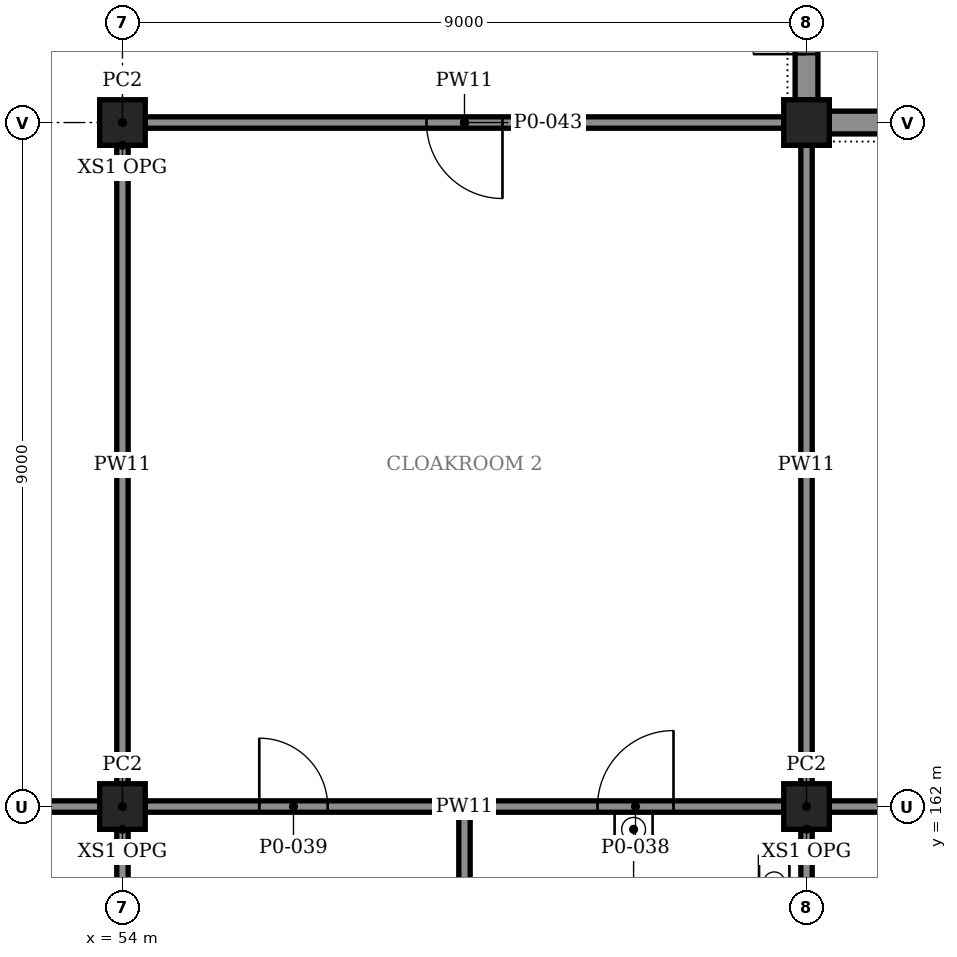
"""IFC4 building model, lengths in metres.
Left out: names, types, materials, properties, quantities, classifications, styles, units other than length and angle.
Written with IfcOpenShell. Run it as: python <this file> out.ifc"""

import sys

from ifc_helpers import new_model, si_unit, direction, frame, frame_2d, origin, origin_2d, place, context, subcontext, project, spatial, rectangle, extrude, element, fill, save


model = new_model("IFC4")
c1 = context("Model", 3, precision=1e-05, world=origin(), true_north=direction((0.0, 1.0)))
c2 = subcontext(c1, "Body", "Model", "MODEL_VIEW")
j1 = project(units=[si_unit("LENGTHUNIT", "METRE"), si_unit("PLANEANGLEUNIT", "RADIAN")], contexts=[c1])
p1 = place(None, origin())
s1 = spatial("IfcSite", under=j1, at=p1, CompositionType="ELEMENT")
p2 = place(p1, origin())
s2 = spatial("IfcBuilding", under=s1, at=p2, CompositionType="ELEMENT")
p3 = place(p2, origin())
s3 = spatial("IfcBuildingStorey", under=s2, at=p3, CompositionType="ELEMENT", Elevation=0.0)
for number, where, z_axis, x_axis in (
    (1, (54.0, 162.0, -2.0), (0.0, 0.0, 1.0), (1.0, 0.0, 0.0)),
    (2, (63.0, 162.0, -2.0), (0.0, 0.0, 1.0), (1.0, 0.0, 0.0)),
    (3, (54.0, 171.0, -2.0), (0.0, 0.0, 1.0), (1.0, 0.0, 0.0)),
    (4, (63.0, 171.0, -2.0), (0.0, 0.0, 1.0), (1.0, 0.0, 0.0)),
):
    element("IfcColumn", number, at=place(p3, frame(where, z_axis=z_axis, x_axis=x_axis)), inside=s3, PredefinedType="COLUMN", context=c2, shape_type="SweptSolid", body=[
        extrude(rectangle(XDim=0.6, YDim=0.6, at=origin_2d()), origin(), (0.0, 0.0, 1.0), 8.0),
    ])
p4 = place(p3, frame((63.0, 171.3, 0.0), z_axis=(0.0, 0.0, 1.0), x_axis=(0.0, 1.0, 0.0)))
e5 = element("IfcWall", 5, at=p4, inside=s3, PredefinedType="SOLIDWALL", context=c2, shape_type="SweptSolid", body=[
    extrude(rectangle(XDim=8.3, YDim=0.3, at=frame_2d((4.15, 0.0))), origin(), (0.0, 0.0, 1.0), 4.82),
])
p5 = place(p4, frame((0.6, 0.0, 0.0)))
e6 = element("IfcOpeningElement", 6, at=p5, cuts=e5, PredefinedType="OPENING", context=c2, shape_type="SweptSolid", body=[
    extrude(rectangle(XDim=1.4, YDim=2.4, at=frame_2d((0.7, 1.2))), frame((0.0, 0.16, 0.0), z_axis=(0.0, -1.0, 0.0), x_axis=(1.0, 0.0, 0.0)), (0.0, 0.0, 1.0), 0.32),
])
p6 = place(p3, frame((63.3, 171.0, 0.0), z_axis=(0.0, 0.0, 1.0), x_axis=(1.0, 0.0, 0.0)))
e7 = element("IfcWall", 7, at=p6, inside=s3, PredefinedType="SOLIDWALL", context=c2, shape_type="SweptSolid", body=[
    extrude(rectangle(XDim=8.3, YDim=0.3, at=frame_2d((4.15, 0.0))), origin(), (0.0, 0.0, 1.0), 4.82),
])
p7 = place(p6, frame((1.0, 0.0, 0.0)))
e8 = element("IfcOpeningElement", 8, at=p7, cuts=e7, PredefinedType="OPENING", context=c2, shape_type="SweptSolid", body=[
    extrude(rectangle(XDim=1.4, YDim=2.4, at=frame_2d((0.7, 1.2))), frame((0.0, 0.16, 0.0), z_axis=(0.0, -1.0, 0.0), x_axis=(1.0, 0.0, 0.0)), (0.0, 0.0, 1.0), 0.32),
])
p8 = place(p3, frame((45.3, 162.0, 0.0), z_axis=(0.0, 0.0, 1.0), x_axis=(1.0, 0.0, 0.0)))
e9 = element("IfcWall", 9, at=p8, inside=s3, PredefinedType="PARTITIONING", context=c2, shape_type="SweptSolid", body=[
    extrude(rectangle(XDim=8.4, YDim=0.15, at=frame_2d((4.2, 0.0))), origin(), (0.0, 0.0, 1.0), 4.82),
])
p9 = place(p8, frame((3.0, 0.0, 0.0)))
e10 = element("IfcOpeningElement", 10, at=p9, cuts=e9, PredefinedType="OPENING", context=c2, shape_type="SweptSolid", body=[
    extrude(rectangle(XDim=2.4, YDim=2.4, at=frame_2d((1.2, 1.2))), frame((0.0, 0.085, 0.0), z_axis=(0.0, -1.0, 0.0), x_axis=(1.0, 0.0, 0.0)), (0.0, 0.0, 1.0), 0.17),
])
p10 = place(p3, frame((54.3, 162.0, 0.0), z_axis=(0.0, 0.0, 1.0), x_axis=(1.0, 0.0, 0.0)))
e11 = element("IfcWall", 11, at=p10, inside=s3, PredefinedType="PARTITIONING", context=c2, shape_type="SweptSolid", body=[
    extrude(rectangle(XDim=8.4, YDim=0.15, at=frame_2d((4.2, 0.0))), origin(), (0.0, 0.0, 1.0), 4.82),
])
p11 = place(p10, frame((5.95, 0.0, 0.0)))
e12 = element("IfcOpeningElement", 12, at=p11, cuts=e11, PredefinedType="OPENING", context=c2, shape_type="SweptSolid", body=[
    extrude(rectangle(XDim=1.0, YDim=2.4, at=frame_2d((0.5, 1.2))), frame((0.0, 0.085, 0.0), z_axis=(0.0, -1.0, 0.0), x_axis=(1.0, 0.0, 0.0)), (0.0, 0.0, 1.0), 0.17),
])
p12 = place(p10, frame((1.5, 0.0, 0.0)))
e13 = element("IfcOpeningElement", 13, at=p12, cuts=e11, PredefinedType="OPENING", context=c2, shape_type="SweptSolid", body=[
    extrude(rectangle(XDim=0.9, YDim=2.1, at=frame_2d((0.45, 1.05))), frame((0.0, 0.085, 0.0), z_axis=(0.0, -1.0, 0.0), x_axis=(1.0, 0.0, 0.0)), (0.0, 0.0, 1.0), 0.17),
])
p13 = place(p3, frame((63.3, 162.0, 0.0), z_axis=(0.0, 0.0, 1.0), x_axis=(1.0, 0.0, 0.0)))
e14 = element("IfcWall", 14, at=p13, inside=s3, PredefinedType="PARTITIONING", context=c2, shape_type="SweptSolid", body=[
    extrude(rectangle(XDim=8.3, YDim=0.15, at=frame_2d((4.15, 0.0))), origin(), (0.0, 0.0, 1.0), 4.82),
])
p14 = place(p13, frame((3.0, 0.0, 0.0)))
e15 = element("IfcOpeningElement", 15, at=p14, cuts=e14, PredefinedType="OPENING", context=c2, shape_type="SweptSolid", body=[
    extrude(rectangle(XDim=2.4, YDim=2.4, at=frame_2d((1.2, 1.2))), frame((0.0, 0.085, 0.0), z_axis=(0.0, -1.0, 0.0), x_axis=(1.0, 0.0, 0.0)), (0.0, 0.0, 1.0), 0.17),
])
p15 = place(p3, frame((63.0, 153.3, 0.0), z_axis=(0.0, 0.0, 1.0), x_axis=(0.0, 1.0, 0.0)))
e16 = element("IfcWall", 16, at=p15, inside=s3, PredefinedType="PARTITIONING", context=c2, shape_type="SweptSolid", body=[
    extrude(rectangle(XDim=8.4, YDim=0.15, at=frame_2d((4.2, 0.0))), origin(), (0.0, 0.0, 1.0), 4.82),
])
p16 = place(p3, frame((54.0, 153.3, 0.0), z_axis=(0.0, 0.0, 1.0), x_axis=(0.0, 1.0, 0.0)))
e17 = element("IfcWall", 17, at=p16, inside=s3, PredefinedType="PARTITIONING", context=c2, shape_type="SweptSolid", body=[
    extrude(rectangle(XDim=8.4, YDim=0.15, at=frame_2d((4.2, 0.0))), origin(), (0.0, 0.0, 1.0), 4.82),
])
p17 = place(p16, frame((2.2, 0.0, 0.0)))
e18 = element("IfcOpeningElement", 18, at=p17, cuts=e17, PredefinedType="OPENING", context=c2, shape_type="SweptSolid", body=[
    extrude(rectangle(XDim=1.0, YDim=2.4, at=frame_2d((0.5, 1.2))), frame((0.0, 0.085, 0.0), z_axis=(0.0, -1.0, 0.0), x_axis=(1.0, 0.0, 0.0)), (0.0, 0.0, 1.0), 0.17),
])
p18 = place(p3, frame((58.5, 159.075, 0.0), z_axis=(0.0, 0.0, 1.0), x_axis=(0.0, 1.0, 0.0)))
e19 = element("IfcWall", 19, at=p18, inside=s3, PredefinedType="PARTITIONING", context=c2, shape_type="SweptSolid", body=[
    extrude(rectangle(XDim=2.85, YDim=0.15, at=frame_2d((1.425, 0.0))), origin(), (0.0, 0.0, 1.0), 5.72),
])
for number, where, z_axis, x_axis in (
    (20, (63.0, 162.3, 0.0), (0.0, 0.0, 1.0), (0.0, 1.0, 0.0)),
    (21, (54.0, 162.3, 0.0), (0.0, 0.0, 1.0), (0.0, 1.0, 0.0)),
):
    element("IfcWall", number, at=place(p3, frame(where, z_axis=z_axis, x_axis=x_axis)), inside=s3, PredefinedType="PARTITIONING", context=c2, shape_type="SweptSolid", body=[
        extrude(rectangle(XDim=8.4, YDim=0.15, at=frame_2d((4.2, 0.0))), origin(), (0.0, 0.0, 1.0), 4.82),
    ])
p19 = place(p3, frame((62.7, 171.0, 0.0), z_axis=(0.0, 0.0, 1.0), x_axis=(-1.0, 0.0, 0.0)))
e22 = element("IfcWall", 22, at=p19, inside=s3, PredefinedType="PARTITIONING", context=c2, shape_type="SweptSolid", body=[
    extrude(rectangle(XDim=8.4, YDim=0.15, at=frame_2d((4.2, 0.0))), origin(), (0.0, 0.0, 1.0), 4.82),
])
p20 = place(p19, frame((3.7, 0.0, 0.0)))
e23 = element("IfcOpeningElement", 23, at=p20, cuts=e22, PredefinedType="OPENING", context=c2, shape_type="SweptSolid", body=[
    extrude(rectangle(XDim=1.0, YDim=2.4, at=frame_2d((0.5, 1.2))), frame((0.0, 0.085, 0.0), z_axis=(0.0, -1.0, 0.0), x_axis=(1.0, 0.0, 0.0)), (0.0, 0.0, 1.0), 0.17),
])
p21 = place(p5, origin())
e24 = element("IfcDoor", 24, at=p21, inside=s3, OperationType="SINGLE_SWING_LEFT", PredefinedType="DOOR", context=c2, shape_type="SweptSolid", body=[
    extrude(rectangle(XDim=1.4, YDim=2.4, at=frame_2d((0.7, 1.2))), frame((0.0, 0.025, 0.0), z_axis=(0.0, -1.0, 0.0), x_axis=(1.0, 0.0, 0.0)), (0.0, 0.0, 1.0), 0.05),
])
fill(e6, e24)
p22 = place(p11, origin())
e25 = element("IfcDoor", 25, at=p22, inside=s3, OperationType="SINGLE_SWING_RIGHT", PredefinedType="DOOR", context=c2, shape_type="SweptSolid", body=[
    extrude(rectangle(XDim=1.0, YDim=2.4, at=frame_2d((0.5, 1.2))), frame((0.0, 0.025, 0.0), z_axis=(0.0, -1.0, 0.0), x_axis=(1.0, 0.0, 0.0)), (0.0, 0.0, 1.0), 0.05),
])
fill(e12, e25)
p23 = place(p12, origin())
e26 = element("IfcDoor", 26, at=p23, inside=s3, OperationType="SINGLE_SWING_LEFT", PredefinedType="DOOR", context=c2, shape_type="SweptSolid", body=[
    extrude(rectangle(XDim=0.9, YDim=2.1, at=frame_2d((0.45, 1.05))), frame((0.0, 0.025, 0.0), z_axis=(0.0, -1.0, 0.0), x_axis=(1.0, 0.0, 0.0)), (0.0, 0.0, 1.0), 0.05),
])
fill(e13, e26)
p24 = place(p20, origin())
e27 = element("IfcDoor", 27, at=p24, inside=s3, OperationType="SINGLE_SWING_LEFT", PredefinedType="DOOR", context=c2, shape_type="SweptSolid", body=[
    extrude(rectangle(XDim=1.0, YDim=2.4, at=frame_2d((0.5, 1.2))), frame((0.0, 0.025, 0.0), z_axis=(0.0, -1.0, 0.0), x_axis=(1.0, 0.0, 0.0)), (0.0, 0.0, 1.0), 0.05),
])
fill(e23, e27)
save(model, sys.argv[1])
